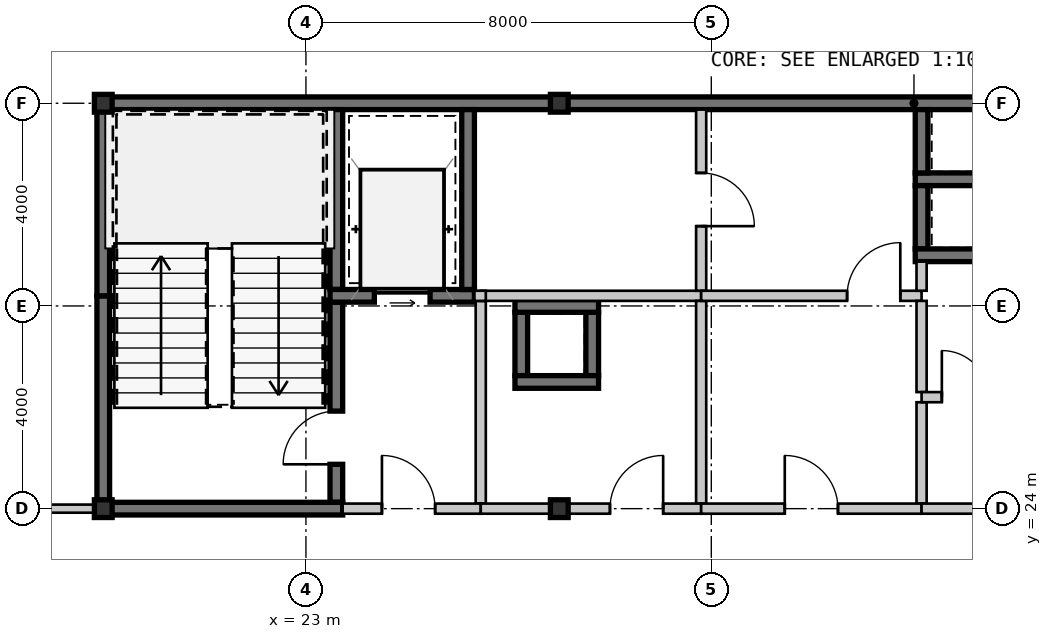
"""IFC4 building model, lengths in metres.
Left out: names, types, materials, properties, quantities, classifications, styles, units other than length and angle.
Written with IfcOpenShell. Run it as: python <this file> out.ifc"""

import sys

from ifc_helpers import new_model, si_unit, direction, frame, frame_2d, origin, origin_2d, place, context, subcontext, project, spatial, rectangle, hollow_rectangle, extrude, source, transform, mapped, element, fill, save


model = new_model("IFC4")
c1 = context("Model", 3, precision=1e-05, world=origin(), true_north=direction((0.0, 1.0)))
c2 = subcontext(c1, "Body", "Model", "MODEL_VIEW")
j1 = project(units=[si_unit("LENGTHUNIT", "METRE"), si_unit("PLANEANGLEUNIT", "RADIAN")], contexts=[c1])
p1 = place(None, origin())
s1 = spatial("IfcSite", under=j1, at=p1, CompositionType="ELEMENT")
p2 = place(p1, origin())
s2 = spatial("IfcBuilding", under=s1, at=p2, CompositionType="ELEMENT")
p3 = place(p2, frame((0.0, 0.0, 178.85)))
s3 = spatial("IfcBuildingStorey", under=s2, at=p3, CompositionType="ELEMENT", Elevation=178.85)
m1 = source(origin(), c2, "Body", "SweptSolid", [
    extrude(hollow_rectangle(XDim=0.35, YDim=0.35, WallThickness=0.016, at=origin_2d()), origin(), (0.0, 0.0, 1.0), 3.15),
])
for number, where, z_axis, x_axis in (
    (1, (19.0, 24.0, 0.0), (0.0, 0.0, 1.0), (1.0, 0.0, 0.0)),
    (2, (28.0, 24.0, 0.0), (0.0, 0.0, 1.0), (1.0, 0.0, 0.0)),
    (3, (19.0, 32.0, 0.0), (0.0, 0.0, 1.0), (1.0, 0.0, 0.0)),
    (4, (28.0, 32.0, 0.0), (0.0, 0.0, 1.0), (1.0, 0.0, 0.0)),
):
    element("IfcColumn", number, at=place(p3, frame(where, z_axis=z_axis, x_axis=x_axis)), inside=s3, PredefinedType="COLUMN", context=c2, shape_type="MappedRepresentation", body=[
        mapped(m1, transform((0.0, 0.0, 0.0), scale=1.0)),
    ])
m2 = source(origin(), c2, "Body", "SweptSolid", [
    extrude(rectangle(XDim=9.125, YDim=0.25, at=frame_2d((4.562, 0.0))), origin(), (0.0, 0.0, 1.0), 2.93),
])
p4 = place(p3, frame((18.875, 32.0, 0.0), z_axis=(0.0, 0.0, 1.0), x_axis=(1.0, 0.0, 0.0)))
e5 = element("IfcWall", 5, at=p4, inside=s3, PredefinedType="SHEAR", context=c2, shape_type="MappedRepresentation", body=[
    mapped(m2, transform((0.0, 0.0, 0.0), scale=1.0)),
])
m3 = source(origin(), c2, "Body", "SweptSolid", [
    extrude(rectangle(XDim=11.2, YDim=0.25, at=frame_2d((5.6, 0.0))), origin(), (0.0, 0.0, 1.0), 2.93),
])
p5 = place(p3, frame((28.0, 32.0, 0.0), z_axis=(0.0, 0.0, 1.0), x_axis=(1.0, 0.0, 0.0)))
e6 = element("IfcWall", 6, at=p5, inside=s3, PredefinedType="SHEAR", context=c2, shape_type="MappedRepresentation", body=[
    mapped(m3, transform((0.0, 0.0, 0.0), scale=1.0)),
])
m4 = source(origin(), c2, "Body", "SweptSolid", [
    extrude(rectangle(XDim=4.075, YDim=0.25, at=frame_2d((2.038, 0.0))), origin(), (0.0, 0.0, 1.0), 2.93),
])
p6 = place(p3, frame((19.0, 24.125, 0.0), z_axis=(0.0, 0.0, 1.0), x_axis=(0.0, 1.0, 0.0)))
e7 = element("IfcWall", 7, at=p6, inside=s3, PredefinedType="SHEAR", context=c2, shape_type="MappedRepresentation", body=[
    mapped(m4, transform((0.0, 0.0, 0.0), scale=1.0)),
])
m5 = source(origin(), c2, "Body", "SweptSolid", [
    extrude(rectangle(XDim=3.675, YDim=0.25, at=frame_2d((1.837, 0.0))), origin(), (0.0, 0.0, 1.0), 2.93),
])
p7 = place(p3, frame((19.0, 28.2, 0.0), z_axis=(0.0, 0.0, 1.0), x_axis=(0.0, 1.0, 0.0)))
e8 = element("IfcWall", 8, at=p7, inside=s3, PredefinedType="SHEAR", context=c2, shape_type="MappedRepresentation", body=[
    mapped(m5, transform((0.0, 0.0, 0.0), scale=1.0)),
])
m6 = source(origin(), c2, "Body", "SweptSolid", [
    extrude(rectangle(XDim=3.55, YDim=0.25, at=frame_2d((1.775, 0.0))), origin(), (0.0, 0.0, 1.0), 2.93),
])
p8 = place(p3, frame((23.6, 28.325, 0.0), z_axis=(0.0, 0.0, 1.0), x_axis=(0.0, 1.0, 0.0)))
e9 = element("IfcWall", 9, at=p8, inside=s3, PredefinedType="SHEAR", context=c2, shape_type="MappedRepresentation", body=[
    mapped(m6, transform((0.0, 0.0, 0.0), scale=1.0)),
])
m7 = source(origin(), c2, "Body", "SweptSolid", [
    extrude(rectangle(XDim=3.95, YDim=0.25, at=frame_2d((1.975, 0.0))), origin(), (0.0, 0.0, 1.0), 2.93),
])
p9 = place(p3, frame((23.6, 24.125, 0.0), z_axis=(0.0, 0.0, 1.0), x_axis=(0.0, 1.0, 0.0)))
e10 = element("IfcWall", 10, at=p9, inside=s3, PredefinedType="SHEAR", context=c2, shape_type="MappedRepresentation", body=[
    mapped(m7, transform((0.0, 0.0, 0.0), scale=1.0)),
])
m8 = source(origin(), c2, "Body", "SweptSolid", [
    extrude(rectangle(XDim=1.05, YDim=2.1, at=frame_2d((0.525, 1.05))), frame((0.0, 0.135, 0.0), z_axis=(0.0, -1.0, 0.0), x_axis=(1.0, 0.0, 0.0)), (0.0, 0.0, 1.0), 0.27),
])
p10 = place(p9, frame((0.75, 0.0, 0.0)))
e11 = element("IfcOpeningElement", 11, at=p10, cuts=e10, PredefinedType="OPENING", context=c2, shape_type="MappedRepresentation", body=[
    mapped(m8, transform((0.0, 0.0, 0.0), scale=1.0)),
])
m9 = source(origin(), c2, "Body", "SweptSolid", [
    extrude(rectangle(XDim=4.85, YDim=0.25, at=frame_2d((2.425, 0.0))), origin(), (0.0, 0.0, 1.0), 2.93),
])
p11 = place(p3, frame((18.875, 24.0, 0.0), z_axis=(0.0, 0.0, 1.0), x_axis=(1.0, 0.0, 0.0)))
e12 = element("IfcWall", 12, at=p11, inside=s3, PredefinedType="SHEAR", context=c2, shape_type="MappedRepresentation", body=[
    mapped(m9, transform((0.0, 0.0, 0.0), scale=1.0)),
])
m10 = source(origin(), c2, "Body", "SweptSolid", [
    extrude(rectangle(XDim=2.85, YDim=0.25, at=frame_2d((1.425, 0.0))), origin(), (0.0, 0.0, 1.0), 2.93),
])
p12 = place(p3, frame((23.475, 28.2, 0.0), z_axis=(0.0, 0.0, 1.0), x_axis=(1.0, 0.0, 0.0)))
e13 = element("IfcWall", 13, at=p12, inside=s3, PredefinedType="SHEAR", context=c2, shape_type="MappedRepresentation", body=[
    mapped(m10, transform((0.0, 0.0, 0.0), scale=1.0)),
])
m11 = source(origin(), c2, "Body", "SweptSolid", [
    extrude(rectangle(XDim=1.1, YDim=2.15, at=frame_2d((0.55, 1.075))), frame((0.0, 0.135, 0.0), z_axis=(0.0, -1.0, 0.0), x_axis=(1.0, 0.0, 0.0)), (0.0, 0.0, 1.0), 0.27),
])
p13 = place(p12, frame((0.875, 0.0, 0.0)))
e14 = element("IfcOpeningElement", 14, at=p13, cuts=e13, PredefinedType="OPENING", context=c2, shape_type="MappedRepresentation", body=[
    mapped(m11, transform((0.0, 0.0, 0.0), scale=1.0)),
])
p14 = place(p3, frame((26.2, 28.325, 0.0), z_axis=(0.0, 0.0, 1.0), x_axis=(0.0, 1.0, 0.0)))
e15 = element("IfcWall", 15, at=p14, inside=s3, PredefinedType="SHEAR", context=c2, shape_type="MappedRepresentation", body=[
    mapped(m6, transform((0.0, 0.0, 0.0), scale=1.0)),
])
m12 = source(origin(), c2, "Body", "SweptSolid", [
    extrude(rectangle(XDim=4.0, YDim=0.2, at=frame_2d((2.0, 0.0))), origin(), (0.0, 0.0, 1.0), 2.93),
])
p15 = place(p3, frame((26.45, 24.1, 0.0), z_axis=(0.0, 0.0, 1.0), x_axis=(0.0, 1.0, 0.0)))
e16 = element("IfcWall", 16, at=p15, inside=s3, PredefinedType="SOLIDWALL", context=c2, shape_type="MappedRepresentation", body=[
    mapped(m12, transform((0.0, 0.0, 0.0), scale=1.0)),
])
m13 = source(origin(), c2, "Body", "SweptSolid", [
    extrude(rectangle(XDim=2.725, YDim=0.2, at=frame_2d((1.362, 0.0))), origin(), (0.0, 0.0, 1.0), 2.47),
])
p16 = place(p3, frame((23.725, 24.0, 0.0), z_axis=(0.0, 0.0, 1.0), x_axis=(1.0, 0.0, 0.0)))
e17 = element("IfcWall", 17, at=p16, inside=s3, PredefinedType="SOLIDWALL", context=c2, shape_type="MappedRepresentation", body=[
    mapped(m13, transform((0.0, 0.0, 0.0), scale=1.0)),
])
m14 = source(origin(), c2, "Body", "SweptSolid", [
    extrude(rectangle(XDim=1.05, YDim=2.1, at=frame_2d((0.525, 1.05))), frame((0.0, 0.11, 0.0), z_axis=(0.0, -1.0, 0.0), x_axis=(1.0, 0.0, 0.0)), (0.0, 0.0, 1.0), 0.22),
])
p17 = place(p16, frame((0.775, 0.0, 0.0)))
e18 = element("IfcOpeningElement", 18, at=p17, cuts=e17, PredefinedType="OPENING", context=c2, shape_type="MappedRepresentation", body=[
    mapped(m14, transform((0.0, 0.0, 0.0), scale=1.0)),
])
m15 = source(origin(), c2, "Body", "SweptSolid", [
    extrude(rectangle(XDim=1.95, YDim=0.25, at=frame_2d((0.975, 0.0))), origin(), (0.0, 0.0, 1.0), 2.93),
])
p18 = place(p3, frame((35.025, 30.5, 0.0), z_axis=(0.0, 0.0, 1.0), x_axis=(1.0, 0.0, 0.0)))
e19 = element("IfcWall", 19, at=p18, inside=s3, PredefinedType="SHEAR", context=c2, shape_type="MappedRepresentation", body=[
    mapped(m15, transform((0.0, 0.0, 0.0), scale=1.0)),
])
m16 = source(origin(), c2, "Body", "SweptSolid", [
    extrude(rectangle(XDim=1.25, YDim=0.25, at=frame_2d((0.625, 0.0))), origin(), (0.0, 0.0, 1.0), 2.93),
])
for number, where, z_axis, x_axis in (
    (20, (35.15, 31.875, 0.0), (0.0, 0.0, 1.0), (0.0, -1.0, 0.0)),
    (21, (35.15, 30.375, 0.0), (0.0, 0.0, 1.0), (0.0, -1.0, 0.0)),
):
    element("IfcWall", number, at=place(p3, frame(where, z_axis=z_axis, x_axis=x_axis)), inside=s3, PredefinedType="SHEAR", context=c2, shape_type="MappedRepresentation", body=[
        mapped(m16, transform((0.0, 0.0, 0.0), scale=1.0)),
    ])
p19 = place(p3, frame((35.025, 29.0, 0.0), z_axis=(0.0, 0.0, 1.0), x_axis=(1.0, 0.0, 0.0)))
e22 = element("IfcWall", 22, at=p19, inside=s3, PredefinedType="SHEAR", context=c2, shape_type="MappedRepresentation", body=[
    mapped(m15, transform((0.0, 0.0, 0.0), scale=1.0)),
])
for number, where, z_axis, x_axis in (
    (23, (28.65, 26.625, 0.0), (0.0, 0.0, 1.0), (0.0, 1.0, 0.0)),
    (24, (27.25, 27.875, 0.0), (0.0, 0.0, 1.0), (0.0, -1.0, 0.0)),
):
    element("IfcWall", number, at=place(p3, frame(where, z_axis=z_axis, x_axis=x_axis)), inside=s3, PredefinedType="SHEAR", context=c2, shape_type="MappedRepresentation", body=[
        mapped(m16, transform((0.0, 0.0, 0.0), scale=1.0)),
    ])
m17 = source(origin(), c2, "Body", "SweptSolid", [
    extrude(rectangle(XDim=1.65, YDim=0.25, at=frame_2d((0.825, 0.0))), origin(), (0.0, 0.0, 1.0), 2.93),
])
for number, where, z_axis, x_axis in (
    (25, (28.775, 28.0, 0.0), (0.0, 0.0, 1.0), (-1.0, 0.0, 0.0)),
    (26, (27.125, 26.5, 0.0), (0.0, 0.0, 1.0), (1.0, 0.0, 0.0)),
):
    element("IfcWall", number, at=place(p3, frame(where, z_axis=z_axis, x_axis=x_axis)), inside=s3, PredefinedType="SHEAR", context=c2, shape_type="MappedRepresentation", body=[
        mapped(m17, transform((0.0, 0.0, 0.0), scale=1.0)),
    ])
m18 = source(origin(), c2, "Body", "SweptSolid", [
    extrude(rectangle(XDim=4.35, YDim=0.2, at=frame_2d((2.175, 0.0))), origin(), (0.0, 0.0, 1.0), 2.93),
])
p20 = place(p3, frame((26.45, 28.2, 0.0), z_axis=(0.0, 0.0, 1.0), x_axis=(1.0, 0.0, 0.0)))
e27 = element("IfcWall", 27, at=p20, inside=s3, PredefinedType="SOLIDWALL", context=c2, shape_type="MappedRepresentation", body=[
    mapped(m18, transform((0.0, 0.0, 0.0), scale=1.0)),
])
p21 = place(p3, frame((30.8, 28.1, 0.0), z_axis=(0.0, 0.0, 1.0), x_axis=(0.0, -1.0, 0.0)))
e28 = element("IfcWall", 28, at=p21, inside=s3, PredefinedType="SOLIDWALL", context=c2, shape_type="MappedRepresentation", body=[
    mapped(m12, transform((0.0, 0.0, 0.0), scale=1.0)),
])
m19 = source(origin(), c2, "Body", "SweptSolid", [
    extrude(rectangle(XDim=4.35, YDim=0.2, at=frame_2d((2.175, 0.0))), origin(), (0.0, 0.0, 1.0), 2.47),
])
p22 = place(p3, frame((30.8, 24.0, 0.0), z_axis=(0.0, 0.0, 1.0), x_axis=(-1.0, 0.0, 0.0)))
e29 = element("IfcWall", 29, at=p22, inside=s3, PredefinedType="SOLIDWALL", context=c2, shape_type="MappedRepresentation", body=[
    mapped(m19, transform((0.0, 0.0, 0.0), scale=1.0)),
])
p23 = place(p22, frame((0.75, 0.0, 0.0)))
e30 = element("IfcOpeningElement", 30, at=p23, cuts=e29, PredefinedType="OPENING", context=c2, shape_type="MappedRepresentation", body=[
    mapped(m14, transform((0.0, 0.0, 0.0), scale=1.0)),
])
m20 = source(origin(), c2, "Body", "SweptSolid", [
    extrude(rectangle(XDim=3.575, YDim=0.2, at=frame_2d((1.788, 0.0))), origin(), (0.0, 0.0, 1.0), 2.93),
])
p24 = place(p3, frame((30.8, 31.875, 0.0), z_axis=(0.0, 0.0, 1.0), x_axis=(0.0, -1.0, 0.0)))
e31 = element("IfcWall", 31, at=p24, inside=s3, PredefinedType="SOLIDWALL", context=c2, shape_type="MappedRepresentation", body=[
    mapped(m20, transform((0.0, 0.0, 0.0), scale=1.0)),
])
p25 = place(p24, frame((1.25, 0.0, 0.0)))
e32 = element("IfcOpeningElement", 32, at=p25, cuts=e31, PredefinedType="OPENING", context=c2, shape_type="MappedRepresentation", body=[
    mapped(m14, transform((0.0, 0.0, 0.0), scale=1.0)),
])
m21 = source(origin(), c2, "Body", "SweptSolid", [
    extrude(rectangle(XDim=4.35, YDim=0.2, at=frame_2d((2.175, 0.0))), origin(), (0.0, 0.0, 1.0), 2.93),
])
p26 = place(p3, frame((30.8, 28.2, 0.0), z_axis=(0.0, 0.0, 1.0), x_axis=(1.0, 0.0, 0.0)))
e33 = element("IfcWall", 33, at=p26, inside=s3, PredefinedType="SOLIDWALL", context=c2, shape_type="MappedRepresentation", body=[
    mapped(m21, transform((0.0, 0.0, 0.0), scale=1.0)),
])
p27 = place(p26, frame((2.88, 0.0, 0.0)))
e34 = element("IfcOpeningElement", 34, at=p27, cuts=e33, PredefinedType="OPENING", context=c2, shape_type="MappedRepresentation", body=[
    mapped(m14, transform((0.0, 0.0, 0.0), scale=1.0)),
])
m22 = source(origin(), c2, "Body", "SweptSolid", [
    extrude(rectangle(XDim=2.0, YDim=0.2, at=frame_2d((1.0, 0.0))), origin(), (0.0, 0.0, 1.0), 2.93),
])
p28 = place(p3, frame((35.15, 26.1, 0.0), z_axis=(0.0, 0.0, 1.0), x_axis=(0.0, -1.0, 0.0)))
e35 = element("IfcWall", 35, at=p28, inside=s3, PredefinedType="SOLIDWALL", context=c2, shape_type="MappedRepresentation", body=[
    mapped(m22, transform((0.0, 0.0, 0.0), scale=1.0)),
])
m23 = source(origin(), c2, "Body", "SweptSolid", [
    extrude(rectangle(XDim=1.8, YDim=0.2, at=frame_2d((0.9, 0.0))), origin(), (0.0, 0.0, 1.0), 2.93),
])
p29 = place(p3, frame((35.15, 28.1, 0.0), z_axis=(0.0, 0.0, 1.0), x_axis=(0.0, -1.0, 0.0)))
e36 = element("IfcWall", 36, at=p29, inside=s3, PredefinedType="SOLIDWALL", context=c2, shape_type="MappedRepresentation", body=[
    mapped(m23, transform((0.0, 0.0, 0.0), scale=1.0)),
])
m24 = source(origin(), c2, "Body", "SweptSolid", [
    extrude(rectangle(XDim=4.35, YDim=0.2, at=frame_2d((2.175, 0.0))), origin(), (0.0, 0.0, 1.0), 2.47),
])
p30 = place(p3, frame((35.15, 24.0, 0.0), z_axis=(0.0, 0.0, 1.0), x_axis=(-1.0, 0.0, 0.0)))
e37 = element("IfcWall", 37, at=p30, inside=s3, PredefinedType="SOLIDWALL", context=c2, shape_type="MappedRepresentation", body=[
    mapped(m24, transform((0.0, 0.0, 0.0), scale=1.0)),
])
p31 = place(p30, frame((1.65, 0.0, 0.0)))
e38 = element("IfcOpeningElement", 38, at=p31, cuts=e37, PredefinedType="OPENING", context=c2, shape_type="MappedRepresentation", body=[
    mapped(m14, transform((0.0, 0.0, 0.0), scale=1.0)),
])
m25 = source(origin(), c2, "Body", "SweptSolid", [
    extrude(rectangle(XDim=0.575, YDim=0.2, at=frame_2d((0.288, 0.0))), origin(), (0.0, 0.0, 1.0), 2.93),
])
p32 = place(p3, frame((35.15, 28.875, 0.0), z_axis=(0.0, 0.0, 1.0), x_axis=(0.0, -1.0, 0.0)))
e39 = element("IfcWall", 39, at=p32, inside=s3, PredefinedType="SOLIDWALL", context=c2, shape_type="MappedRepresentation", body=[
    mapped(m25, transform((0.0, 0.0, 0.0), scale=1.0)),
])
m26 = source(origin(), c2, "Body", "SweptSolid", [
    extrude(rectangle(XDim=1.72, YDim=0.2, at=frame_2d((0.86, 0.0))), origin(), (0.0, 0.0, 1.0), 2.93),
])
p33 = place(p3, frame((35.15, 26.2, 0.0), z_axis=(0.0, 0.0, 1.0), x_axis=(1.0, 0.0, 0.0)))
e40 = element("IfcWall", 40, at=p33, inside=s3, PredefinedType="SOLIDWALL", context=c2, shape_type="MappedRepresentation", body=[
    mapped(m26, transform((0.0, 0.0, 0.0), scale=1.0)),
])
m27 = source(origin(), c2, "Body", "SweptSolid", [
    extrude(rectangle(XDim=0.92, YDim=2.1, at=frame_2d((0.46, 1.05))), frame((0.0, 0.11, 0.0), z_axis=(0.0, -1.0, 0.0), x_axis=(1.0, 0.0, 0.0)), (0.0, 0.0, 1.0), 0.22),
])
p34 = place(p33, frame((0.4, 0.0, 0.0)))
e41 = element("IfcOpeningElement", 41, at=p34, cuts=e40, PredefinedType="OPENING", context=c2, shape_type="MappedRepresentation", body=[
    mapped(m27, transform((0.0, 0.0, 0.0), scale=1.0)),
])
m28 = source(origin(), c2, "Body", "SweptSolid", [
    extrude(rectangle(XDim=4.05, YDim=0.2, at=frame_2d((2.025, 0.0))), origin(), (0.0, 0.0, 1.0), 2.47),
])
p35 = place(p3, frame((39.2, 24.0, 0.0), z_axis=(0.0, 0.0, 1.0), x_axis=(-1.0, 0.0, 0.0)))
e42 = element("IfcWall", 42, at=p35, inside=s3, PredefinedType="SOLIDWALL", context=c2, shape_type="MappedRepresentation", body=[
    mapped(m28, transform((0.0, 0.0, 0.0), scale=1.0)),
])
p36 = place(p35, frame((1.5, 0.0, 0.0)))
e43 = element("IfcOpeningElement", 43, at=p36, cuts=e42, PredefinedType="OPENING", context=c2, shape_type="MappedRepresentation", body=[
    mapped(m14, transform((0.0, 0.0, 0.0), scale=1.0)),
])
m29 = source(origin(), c2, "Body", "SweptSolid", [
    extrude(rectangle(XDim=6.251, YDim=0.16, at=frame_2d((3.125, 0.0))), origin(), (0.0, 0.0, 1.0), 2.93),
])
p37 = place(p3, frame((12.624, 24.0, 0.0), z_axis=(0.0, 0.0, 1.0), x_axis=(1.0, 0.0, 0.0)))
e44 = element("IfcWall", 44, at=p37, inside=s3, PredefinedType="PARTITIONING", context=c2, shape_type="MappedRepresentation", body=[
    mapped(m29, transform((0.0, 0.0, 0.0), scale=1.0)),
])
m30 = source(origin(), c2, "Body", "SweptSolid", [
    extrude(rectangle(XDim=0.92, YDim=2.1, at=frame_2d((0.46, 1.05))), frame((0.0, 0.09, 0.0), z_axis=(0.0, -1.0, 0.0), x_axis=(1.0, 0.0, 0.0)), (0.0, 0.0, 1.0), 0.18),
])
p38 = place(p37, frame((2.718, 0.0, 0.0)))
e45 = element("IfcOpeningElement", 45, at=p38, cuts=e44, PredefinedType="OPENING", context=c2, shape_type="MappedRepresentation", body=[
    mapped(m30, transform((0.0, 0.0, 0.0), scale=1.0)),
])
m31 = source(origin(), c2, "Body", "SweptSolid", [
    extrude(rectangle(XDim=0.225, YDim=0.2, at=frame_2d((0.113, 0.0))), origin(), (0.0, 0.0, 1.0), 2.93),
])
p39 = place(p3, frame((26.325, 28.2, 0.0), z_axis=(0.0, 0.0, 1.0), x_axis=(1.0, 0.0, 0.0)))
e46 = element("IfcWall", 46, at=p39, inside=s3, PredefinedType="SOLIDWALL", context=c2, shape_type="MappedRepresentation", body=[
    mapped(m31, transform((0.0, 0.0, 0.0), scale=1.0)),
])
m32 = source(origin(), c2, "Body", "SweptSolid", [
    extrude(rectangle(XDim=1.05, YDim=2.1, at=frame_2d((0.525, 1.05))), frame((0.0, 0.025, 0.0), z_axis=(0.0, -1.0, 0.0), x_axis=(1.0, 0.0, 0.0)), (0.0, 0.0, 1.0), 0.05),
])
p40 = place(p10, origin())
e47 = element("IfcDoor", 47, at=p40, inside=s3, OperationType="SINGLE_SWING_LEFT", PredefinedType="DOOR", context=c2, shape_type="MappedRepresentation", body=[
    mapped(m32, transform((0.0, 0.0, 0.0), scale=1.0)),
])
fill(e11, e47)
m33 = source(origin(), c2, "Body", "SweptSolid", [
    extrude(rectangle(XDim=1.1, YDim=2.15, at=frame_2d((0.55, 1.075))), frame((0.0, 0.025, 0.0), z_axis=(0.0, -1.0, 0.0), x_axis=(1.0, 0.0, 0.0)), (0.0, 0.0, 1.0), 0.05),
])
p41 = place(p13, origin())
e48 = element("IfcDoor", 48, at=p41, inside=s3, OperationType="SLIDING_TO_LEFT", PredefinedType="DOOR", context=c2, shape_type="MappedRepresentation", body=[
    mapped(m33, transform((0.0, 0.0, 0.0), scale=1.0)),
])
fill(e14, e48)
p42 = place(p17, origin())
e49 = element("IfcDoor", 49, at=p42, inside=s3, OperationType="SINGLE_SWING_LEFT", PredefinedType="DOOR", context=c2, shape_type="MappedRepresentation", body=[
    mapped(m32, transform((0.0, 0.0, 0.0), scale=1.0)),
])
fill(e18, e49)
p43 = place(p23, frame((1.05, 0.0, 0.0), z_axis=(0.0, 0.0, 1.0), x_axis=(-1.0, 0.0, 0.0)))
e50 = element("IfcDoor", 50, at=p43, inside=s3, OperationType="SINGLE_SWING_RIGHT", PredefinedType="DOOR", context=c2, shape_type="MappedRepresentation", body=[
    mapped(m32, transform((0.0, 0.0, 0.0), scale=1.0)),
])
fill(e30, e50)
p44 = place(p25, origin())
e51 = element("IfcDoor", 51, at=p44, inside=s3, OperationType="SINGLE_SWING_RIGHT", PredefinedType="DOOR", context=c2, shape_type="MappedRepresentation", body=[
    mapped(m32, transform((0.0, 0.0, 0.0), scale=1.0)),
])
fill(e32, e51)
p45 = place(p27, origin())
e52 = element("IfcDoor", 52, at=p45, inside=s3, OperationType="SINGLE_SWING_RIGHT", PredefinedType="DOOR", context=c2, shape_type="MappedRepresentation", body=[
    mapped(m32, transform((0.0, 0.0, 0.0), scale=1.0)),
])
fill(e34, e52)
p46 = place(p31, frame((1.05, 0.0, 0.0), z_axis=(0.0, 0.0, 1.0), x_axis=(-1.0, 0.0, 0.0)))
e53 = element("IfcDoor", 53, at=p46, inside=s3, OperationType="SINGLE_SWING_LEFT", PredefinedType="DOOR", context=c2, shape_type="MappedRepresentation", body=[
    mapped(m32, transform((0.0, 0.0, 0.0), scale=1.0)),
])
fill(e38, e53)
m34 = source(origin(), c2, "Body", "SweptSolid", [
    extrude(rectangle(XDim=0.92, YDim=2.1, at=frame_2d((0.46, 1.05))), frame((0.0, 0.025, 0.0), z_axis=(0.0, -1.0, 0.0), x_axis=(1.0, 0.0, 0.0)), (0.0, 0.0, 1.0), 0.05),
])
p47 = place(p34, origin())
e54 = element("IfcDoor", 54, at=p47, inside=s3, OperationType="SINGLE_SWING_LEFT", PredefinedType="DOOR", context=c2, shape_type="MappedRepresentation", body=[
    mapped(m34, transform((0.0, 0.0, 0.0), scale=1.0)),
])
fill(e41, e54)
save(model, sys.argv[1])
